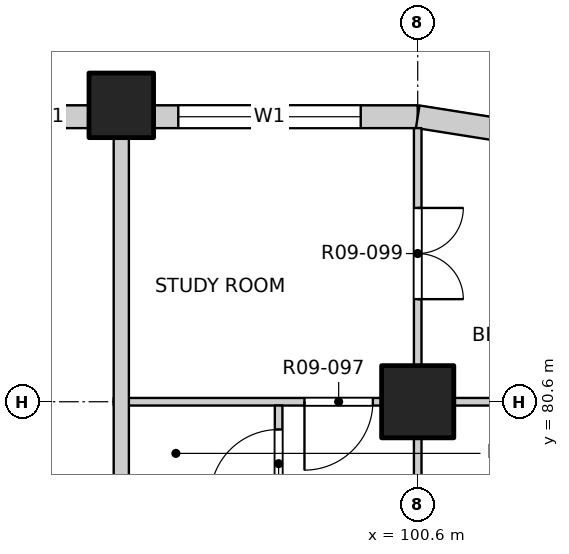
"""IFC4 building model, lengths in metres.
Left out: names, types, materials, properties, quantities, classifications, styles, units other than length and angle.
Written with IfcOpenShell. Run it as: python <this file> out.ifc"""

import sys

from ifc_helpers import new_model, si_unit, direction, frame, frame_2d, origin, origin_2d, place, context, subcontext, project, spatial, rectangle, extrude, element, fill, save


model = new_model("IFC4")
c1 = context("Model", 3, precision=1e-05, world=origin(), true_north=direction((0.0, 1.0)))
c2 = subcontext(c1, "Body", "Model", "MODEL_VIEW")
j1 = project(units=[si_unit("LENGTHUNIT", "METRE"), si_unit("PLANEANGLEUNIT", "RADIAN")], contexts=[c1])
p1 = place(None, origin())
s1 = spatial("IfcSite", under=j1, at=p1, CompositionType="ELEMENT")
p2 = place(p1, origin())
s2 = spatial("IfcBuilding", under=s1, at=p2, CompositionType="ELEMENT")
p3 = place(p2, frame((0.0, 0.0, 113.5)))
s3 = spatial("IfcBuildingStorey", under=s2, at=p3, CompositionType="ELEMENT", Elevation=113.5)
p4 = place(p3, frame((96.7, 84.5, -0.25), z_axis=(0.0, 0.0, 1.0), x_axis=(1.0, 0.0, 0.0)))
e1 = element("IfcColumn", 1, at=p4, inside=s3, PredefinedType="COLUMN", context=c2, shape_type="SweptSolid", body=[
    extrude(rectangle(XDim=0.85, YDim=0.85, at=origin_2d()), origin(), (0.0, 0.0, 1.0), 3.35),
])
p5 = place(p3, frame((100.6, 80.6, -0.25), z_axis=(0.0, 0.0, 1.0), x_axis=(1.0, 0.0, 0.0)))
e2 = element("IfcColumn", 2, at=p5, inside=s3, PredefinedType="COLUMN", context=c2, shape_type="SweptSolid", body=[
    extrude(rectangle(XDim=0.95, YDim=0.95, at=origin_2d()), origin(), (0.0, 0.0, 1.0), 3.35),
])
p6 = place(p3, frame((95.025, 84.35, 0.0), z_axis=(0.0, 0.0, 1.0), x_axis=(1.0, 0.0, 0.0)))
e3 = element("IfcWall", 3, at=p6, inside=s3, PredefinedType="SOLIDWALL", context=c2, shape_type="SweptSolid", body=[
    extrude(rectangle(XDim=1.25, YDim=0.3, at=frame_2d((0.625, 0.0))), origin(), (0.0, 0.0, 1.0), 3.1),
])
p7 = place(p3, frame((97.125, 84.35, 0.0), z_axis=(0.0, 0.0, 1.0), x_axis=(1.0, 0.0, 0.0)))
e4 = element("IfcWall", 4, at=p7, inside=s3, PredefinedType="SOLIDWALL", context=c2, shape_type="SweptSolid", body=[
    extrude(rectangle(XDim=3.475, YDim=0.3, at=frame_2d((1.738, 0.0))), origin(), (0.0, 0.0, 1.0), 3.1),
])
p8 = place(p7, frame((0.325, 0.0, 0.9)))
e5 = element("IfcOpeningElement", 5, at=p8, cuts=e4, PredefinedType="OPENING", context=c2, shape_type="SweptSolid", body=[
    extrude(rectangle(XDim=2.4, YDim=1.8, at=frame_2d((1.2, 0.9))), frame((0.0, 0.16, 0.0), z_axis=(0.0, -1.0, 0.0), x_axis=(1.0, 0.0, 0.0)), (0.0, 0.0, 1.0), 0.32),
])
p9 = place(p3, frame((101.759, 84.167, 0.0), z_axis=(0.0, 0.0, 1.0), x_axis=(-0.987678452879, 0.156496880861, 0.0)))
e6 = element("IfcWall", 6, at=p9, inside=s3, PredefinedType="SOLIDWALL", context=c2, shape_type="SweptSolid", body=[
    extrude(rectangle(XDim=1.173, YDim=0.3, at=frame_2d((0.586, 0.0))), origin(), (0.0, 0.0, 1.0), 3.1),
])
p10 = place(p3, frame((96.6, 80.6, 0.0), z_axis=(0.0, 0.0, 1.0), x_axis=(1.0, 0.0, 0.0)))
e7 = element("IfcWall", 7, at=p10, inside=s3, PredefinedType="PARTITIONING", context=c2, shape_type="SweptSolid", body=[
    extrude(rectangle(XDim=7.6, YDim=0.1, at=frame_2d((3.8, 0.0))), origin(), (0.0, 0.0, 1.0), 3.1),
])
p11 = place(p10, frame((2.51, 0.0, 0.0)))
e8 = element("IfcOpeningElement", 8, at=p11, cuts=e7, PredefinedType="OPENING", context=c2, shape_type="SweptSolid", body=[
    extrude(rectangle(XDim=0.9, YDim=2.1, at=frame_2d((0.45, 1.05))), frame((0.0, 0.06, 0.0), z_axis=(0.0, -1.0, 0.0), x_axis=(1.0, 0.0, 0.0)), (0.0, 0.0, 1.0), 0.12),
])
p12 = place(p3, frame((96.7, 53.4, 0.0), z_axis=(0.0, 0.0, 1.0), x_axis=(0.0, 1.0, 0.0)))
e9 = element("IfcWall", 9, at=p12, inside=s3, PredefinedType="PARTITIONING", context=c2, shape_type="SweptSolid", body=[
    extrude(rectangle(XDim=30.8, YDim=0.2, at=frame_2d((15.4, 0.0))), origin(), (0.0, 0.0, 1.0), 3.1),
])
p13 = place(p12, frame((2.875, 0.0, 0.0)))
e10 = element("IfcOpeningElement", 10, at=p13, cuts=e9, PredefinedType="OPENING", context=c2, shape_type="SweptSolid", body=[
    extrude(rectangle(XDim=1.0, YDim=2.1, at=frame_2d((0.5, 1.05))), frame((0.0, 0.11, 0.0), z_axis=(0.0, -1.0, 0.0), x_axis=(1.0, 0.0, 0.0)), (0.0, 0.0, 1.0), 0.22),
])
p14 = place(p12, frame((14.775, 0.0, 0.0)))
e11 = element("IfcOpeningElement", 11, at=p14, cuts=e9, PredefinedType="OPENING", context=c2, shape_type="SweptSolid", body=[
    extrude(rectangle(XDim=1.0, YDim=2.1, at=frame_2d((0.5, 1.05))), frame((0.0, 0.11, 0.0), z_axis=(0.0, -1.0, 0.0), x_axis=(1.0, 0.0, 0.0)), (0.0, 0.0, 1.0), 0.22),
])
p15 = place(p12, frame((20.025, 0.0, 0.0)))
e12 = element("IfcOpeningElement", 12, at=p15, cuts=e9, PredefinedType="OPENING", context=c2, shape_type="SweptSolid", body=[
    extrude(rectangle(XDim=1.0, YDim=2.1, at=frame_2d((0.5, 1.05))), frame((0.0, 0.11, 0.0), z_axis=(0.0, -1.0, 0.0), x_axis=(1.0, 0.0, 0.0)), (0.0, 0.0, 1.0), 0.22),
])
p16 = place(p3, frame((98.77, 75.75, 0.0), z_axis=(0.0, 0.0, 1.0), x_axis=(0.0, 1.0, 0.0)))
e13 = element("IfcWall", 13, at=p16, inside=s3, PredefinedType="PARTITIONING", context=c2, shape_type="SweptSolid", body=[
    extrude(rectangle(XDim=4.8, YDim=0.1, at=frame_2d((2.4, 0.0))), origin(), (0.0, 0.0, 1.0), 3.1),
])
p17 = place(p16, frame((0.175, 0.0, 0.0)))
e14 = element("IfcOpeningElement", 14, at=p17, cuts=e13, PredefinedType="OPENING", context=c2, shape_type="SweptSolid", body=[
    extrude(rectangle(XDim=0.8, YDim=2.1, at=frame_2d((0.4, 1.05))), frame((0.0, 0.06, 0.0), z_axis=(0.0, -1.0, 0.0), x_axis=(1.0, 0.0, 0.0)), (0.0, 0.0, 1.0), 0.12),
])
p18 = place(p16, frame((1.76, 0.0, 0.0)))
e15 = element("IfcOpeningElement", 15, at=p18, cuts=e13, PredefinedType="OPENING", context=c2, shape_type="SweptSolid", body=[
    extrude(rectangle(XDim=0.9, YDim=2.1, at=frame_2d((0.45, 1.05))), frame((0.0, 0.06, 0.0), z_axis=(0.0, -1.0, 0.0), x_axis=(1.0, 0.0, 0.0)), (0.0, 0.0, 1.0), 0.12),
])
p19 = place(p16, frame((3.585, 0.0, 0.0)))
e16 = element("IfcOpeningElement", 16, at=p19, cuts=e13, PredefinedType="OPENING", context=c2, shape_type="SweptSolid", body=[
    extrude(rectangle(XDim=0.9, YDim=2.1, at=frame_2d((0.45, 1.05))), frame((0.0, 0.06, 0.0), z_axis=(0.0, -1.0, 0.0), x_axis=(1.0, 0.0, 0.0)), (0.0, 0.0, 1.0), 0.12),
])
p20 = place(p3, frame((100.6, 45.8, 0.0), z_axis=(0.0, 0.0, 1.0), x_axis=(0.0, 1.0, 0.0)))
e17 = element("IfcWall", 17, at=p20, inside=s3, PredefinedType="PARTITIONING", context=c2, shape_type="SweptSolid", body=[
    extrude(rectangle(XDim=38.4, YDim=0.1, at=frame_2d((19.2, 0.0))), origin(), (0.0, 0.0, 1.0), 3.1),
])
p21 = place(p20, frame((1.05, 0.0, 0.0)))
e18 = element("IfcOpeningElement", 18, at=p21, cuts=e17, PredefinedType="OPENING", context=c2, shape_type="SweptSolid", body=[
    extrude(rectangle(XDim=1.2, YDim=2.1, at=frame_2d((0.6, 1.05))), frame((0.0, 0.06, 0.0), z_axis=(0.0, -1.0, 0.0), x_axis=(1.0, 0.0, 0.0)), (0.0, 0.0, 1.0), 0.12),
])
p22 = place(p20, frame((5.1, 0.0, 0.0)))
e19 = element("IfcOpeningElement", 19, at=p22, cuts=e17, PredefinedType="OPENING", context=c2, shape_type="SweptSolid", body=[
    extrude(rectangle(XDim=0.9, YDim=2.1, at=frame_2d((0.45, 1.05))), frame((0.0, 0.06, 0.0), z_axis=(0.0, -1.0, 0.0), x_axis=(1.0, 0.0, 0.0)), (0.0, 0.0, 1.0), 0.12),
])
p23 = place(p20, frame((9.625, 0.0, 0.0)))
e20 = element("IfcOpeningElement", 20, at=p23, cuts=e17, PredefinedType="OPENING", context=c2, shape_type="SweptSolid", body=[
    extrude(rectangle(XDim=1.2, YDim=2.1, at=frame_2d((0.6, 1.05))), frame((0.0, 0.06, 0.0), z_axis=(0.0, -1.0, 0.0), x_axis=(1.0, 0.0, 0.0)), (0.0, 0.0, 1.0), 0.12),
])
p24 = place(p20, frame((16.8, 0.0, 0.0)))
e21 = element("IfcOpeningElement", 21, at=p24, cuts=e17, PredefinedType="OPENING", context=c2, shape_type="SweptSolid", body=[
    extrude(rectangle(XDim=0.9, YDim=2.1, at=frame_2d((0.45, 1.05))), frame((0.0, 0.06, 0.0), z_axis=(0.0, -1.0, 0.0), x_axis=(1.0, 0.0, 0.0)), (0.0, 0.0, 1.0), 0.12),
])
p25 = place(p20, frame((20.7, 0.0, 0.0)))
e22 = element("IfcOpeningElement", 22, at=p25, cuts=e17, PredefinedType="OPENING", context=c2, shape_type="SweptSolid", body=[
    extrude(rectangle(XDim=0.9, YDim=2.1, at=frame_2d((0.45, 1.05))), frame((0.0, 0.06, 0.0), z_axis=(0.0, -1.0, 0.0), x_axis=(1.0, 0.0, 0.0)), (0.0, 0.0, 1.0), 0.12),
])
p26 = place(p20, frame((24.6, 0.0, 0.0)))
e23 = element("IfcOpeningElement", 23, at=p26, cuts=e17, PredefinedType="OPENING", context=c2, shape_type="SweptSolid", body=[
    extrude(rectangle(XDim=0.9, YDim=2.1, at=frame_2d((0.45, 1.05))), frame((0.0, 0.06, 0.0), z_axis=(0.0, -1.0, 0.0), x_axis=(1.0, 0.0, 0.0)), (0.0, 0.0, 1.0), 0.12),
])
p27 = place(p20, frame((28.5, 0.0, 0.0)))
e24 = element("IfcOpeningElement", 24, at=p27, cuts=e17, PredefinedType="OPENING", context=c2, shape_type="SweptSolid", body=[
    extrude(rectangle(XDim=0.9, YDim=2.1, at=frame_2d((0.45, 1.05))), frame((0.0, 0.06, 0.0), z_axis=(0.0, -1.0, 0.0), x_axis=(1.0, 0.0, 0.0)), (0.0, 0.0, 1.0), 0.12),
])
p28 = place(p20, frame((32.4, 0.0, 0.0)))
e25 = element("IfcOpeningElement", 25, at=p28, cuts=e17, PredefinedType="OPENING", context=c2, shape_type="SweptSolid", body=[
    extrude(rectangle(XDim=0.9, YDim=2.1, at=frame_2d((0.45, 1.05))), frame((0.0, 0.06, 0.0), z_axis=(0.0, -1.0, 0.0), x_axis=(1.0, 0.0, 0.0)), (0.0, 0.0, 1.0), 0.12),
])
p29 = place(p20, frame((36.15, 0.0, 0.0)))
e26 = element("IfcOpeningElement", 26, at=p29, cuts=e17, PredefinedType="OPENING", context=c2, shape_type="SweptSolid", body=[
    extrude(rectangle(XDim=1.2, YDim=2.1, at=frame_2d((0.6, 1.05))), frame((0.0, 0.06, 0.0), z_axis=(0.0, -1.0, 0.0), x_axis=(1.0, 0.0, 0.0)), (0.0, 0.0, 1.0), 0.12),
])
p30 = place(p8, origin())
e27 = element("IfcWindow", 27, at=p30, inside=s3, PartitioningType="DOUBLE_PANEL_VERTICAL", PredefinedType="WINDOW", context=c2, shape_type="SweptSolid", body=[
    extrude(rectangle(XDim=2.4, YDim=1.8, at=frame_2d((1.2, 0.9))), frame((0.0, 0.03, 0.0), z_axis=(0.0, -1.0, 0.0), x_axis=(1.0, 0.0, 0.0)), (0.0, 0.0, 1.0), 0.06),
])
fill(e5, e27)
p31 = place(p19, origin())
e28 = element("IfcDoor", 28, at=p31, inside=s3, OperationType="SINGLE_SWING_LEFT", PredefinedType="DOOR", context=c2, shape_type="SweptSolid", body=[
    extrude(rectangle(XDim=0.9, YDim=2.1, at=frame_2d((0.45, 1.05))), frame((0.0, 0.025, 0.0), z_axis=(0.0, -1.0, 0.0), x_axis=(1.0, 0.0, 0.0)), (0.0, 0.0, 1.0), 0.05),
])
fill(e16, e28)
p32 = place(p11, origin())
e29 = element("IfcDoor", 29, at=p32, inside=s3, OperationType="SINGLE_SWING_RIGHT", PredefinedType="DOOR", context=c2, shape_type="SweptSolid", body=[
    extrude(rectangle(XDim=0.9, YDim=2.1, at=frame_2d((0.45, 1.05))), frame((0.0, 0.025, 0.0), z_axis=(0.0, -1.0, 0.0), x_axis=(1.0, 0.0, 0.0)), (0.0, 0.0, 1.0), 0.05),
])
fill(e8, e29)
p33 = place(p29, origin())
e30 = element("IfcDoor", 30, at=p33, inside=s3, OperationType="DOUBLE_DOOR_SINGLE_SWING", PredefinedType="DOOR", context=c2, shape_type="SweptSolid", body=[
    extrude(rectangle(XDim=1.2, YDim=2.1, at=frame_2d((0.6, 1.05))), frame((0.0, 0.025, 0.0), z_axis=(0.0, -1.0, 0.0), x_axis=(1.0, 0.0, 0.0)), (0.0, 0.0, 1.0), 0.05),
])
fill(e26, e30)
save(model, sys.argv[1])
